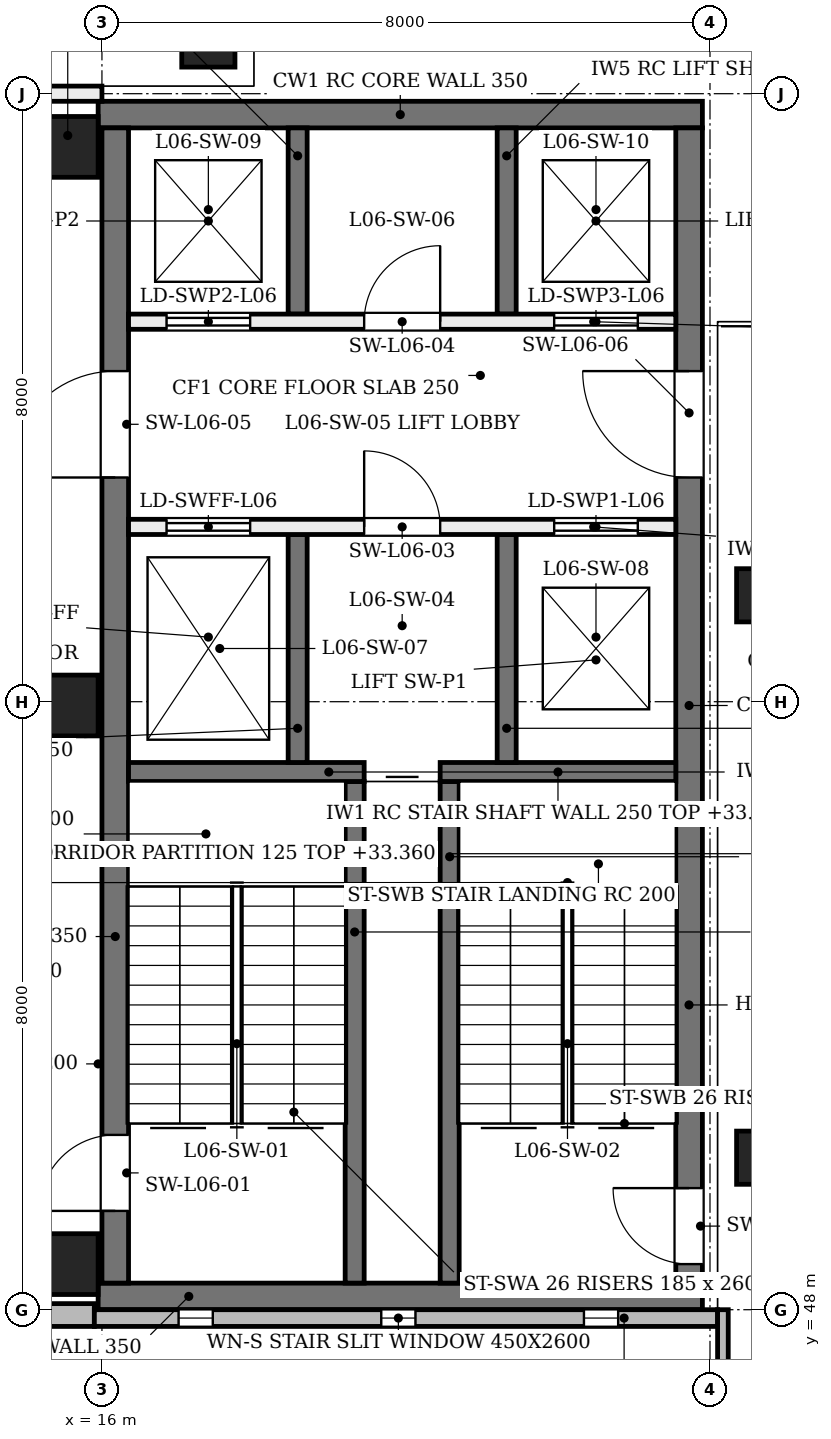
"""IFC4 building model, lengths in metres.
Left out: names, types, materials, properties, quantities, classifications, styles, units other than length and angle.
Written with IfcOpenShell. Run it as: python <this file> out.ifc"""

import sys

from ifc_helpers import new_model, si_unit, direction, frame, frame_2d, origin, origin_2d, place, context, subcontext, project, spatial, rectangle, extrude, element, fill, save


model = new_model("IFC4")
c1 = context("Model", 3, precision=1e-05, world=origin(), true_north=direction((0.0, 1.0)))
c2 = subcontext(c1, "Body", "Model", "MODEL_VIEW")
j1 = project(units=[si_unit("LENGTHUNIT", "METRE"), si_unit("PLANEANGLEUNIT", "RADIAN")], contexts=[c1])
p1 = place(None, origin())
s1 = spatial("IfcSite", under=j1, at=p1, CompositionType="ELEMENT")
p2 = place(p1, origin())
s2 = spatial("IfcBuilding", under=s1, at=p2, CompositionType="ELEMENT")
p3 = place(p2, frame((0.0, 0.0, 28.8)))
s3 = spatial("IfcBuildingStorey", under=s2, at=p3, CompositionType="ELEMENT", Elevation=28.8)
for number, where, z_axis, x_axis in (
    (1, (15.95, 48.175, 0.0), (0.0, 0.0, 1.0), (1.0, 0.0, 0.0)),
    (2, (15.95, 63.725, 0.0), (0.0, 0.0, 1.0), (1.0, 0.0, 0.0)),
):
    element("IfcWall", number, at=place(p3, frame(where, z_axis=z_axis, x_axis=x_axis)), inside=s3, PredefinedType="SHEAR", context=c2, shape_type="SweptSolid", body=[
        extrude(rectangle(XDim=7.95, YDim=0.35, at=frame_2d((3.975, 0.0))), origin(), (0.0, 0.0, 1.0), 4.58),
    ])
p4 = place(p3, frame((16.175, 48.35, 0.0), z_axis=(0.0, 0.0, 1.0), x_axis=(0.0, 1.0, 0.0)))
e3 = element("IfcWall", 3, at=p4, inside=s3, PredefinedType="SHEAR", context=c2, shape_type="SweptSolid", body=[
    extrude(rectangle(XDim=15.2, YDim=0.35, at=frame_2d((7.6, 0.0))), origin(), (0.0, 0.0, 1.0), 4.58),
])
p5 = place(p4, frame((0.95, 0.0, 0.0)))
e4 = element("IfcOpeningElement", 4, at=p5, cuts=e3, PredefinedType="OPENING", context=c2, shape_type="SweptSolid", body=[
    extrude(rectangle(XDim=1.0, YDim=2.1, at=frame_2d((0.5, 1.05))), frame((0.0, 0.185, 0.0), z_axis=(0.0, -1.0, 0.0), x_axis=(1.0, 0.0, 0.0)), (0.0, 0.0, 1.0), 0.37),
])
p6 = place(p4, frame((10.6, 0.0, 0.0)))
e5 = element("IfcOpeningElement", 5, at=p6, cuts=e3, PredefinedType="OPENING", context=c2, shape_type="SweptSolid", body=[
    extrude(rectangle(XDim=1.4, YDim=2.1, at=frame_2d((0.7, 1.05))), frame((0.0, 0.185, 0.0), z_axis=(0.0, -1.0, 0.0), x_axis=(1.0, 0.0, 0.0)), (0.0, 0.0, 1.0), 0.37),
])
p7 = place(p3, frame((23.725, 48.35, 0.0), z_axis=(0.0, 0.0, 1.0), x_axis=(0.0, 1.0, 0.0)))
e6 = element("IfcWall", 6, at=p7, inside=s3, PredefinedType="SHEAR", context=c2, shape_type="SweptSolid", body=[
    extrude(rectangle(XDim=15.2, YDim=0.35, at=frame_2d((7.6, 0.0))), origin(), (0.0, 0.0, 1.0), 4.58),
])
p8 = place(p7, frame((0.25, 0.0, 0.0)))
e7 = element("IfcOpeningElement", 7, at=p8, cuts=e6, PredefinedType="OPENING", context=c2, shape_type="SweptSolid", body=[
    extrude(rectangle(XDim=1.0, YDim=2.1, at=frame_2d((0.5, 1.05))), frame((0.0, 0.185, 0.0), z_axis=(0.0, -1.0, 0.0), x_axis=(1.0, 0.0, 0.0)), (0.0, 0.0, 1.0), 0.37),
])
p9 = place(p7, frame((10.6, 0.0, 0.0)))
e8 = element("IfcOpeningElement", 8, at=p9, cuts=e6, PredefinedType="OPENING", context=c2, shape_type="SweptSolid", body=[
    extrude(rectangle(XDim=1.4, YDim=2.1, at=frame_2d((0.7, 1.05))), frame((0.0, 0.185, 0.0), z_axis=(0.0, -1.0, 0.0), x_axis=(1.0, 0.0, 0.0)), (0.0, 0.0, 1.0), 0.37),
])
for number, where, z_axis, x_axis in (
    (9, (15.55, 48.6, 0.0), (0.0, 0.0, 1.0), (1.0, 0.0, 0.0)),
    (10, (15.55, 55.95, 0.0), (0.0, 0.0, 1.0), (1.0, 0.0, 0.0)),
    (11, (15.55, 63.3, 0.0), (0.0, 0.0, 1.0), (1.0, 0.0, 0.0)),
):
    element("IfcColumn", number, at=place(p3, frame(where, z_axis=z_axis, x_axis=x_axis)), inside=s3, PredefinedType="COLUMN", context=c2, shape_type="SweptSolid", body=[
        extrude(rectangle(XDim=0.8, YDim=0.8, at=origin_2d()), origin(), (0.0, 0.0, 1.0), 4.58),
    ])
for number, where, z_axis, x_axis in (
    (12, (24.7, 50.0, 0.0), (0.0, 0.0, 1.0), (1.0, 0.0, 0.0)),
    (13, (24.7, 57.4, 0.0), (0.0, 0.0, 1.0), (1.0, 0.0, 0.0)),
    (14, (17.4, 64.7, 0.0), (0.0, 0.0, 1.0), (1.0, 0.0, 0.0)),
):
    element("IfcColumn", number, at=place(p3, frame(where, z_axis=z_axis, x_axis=x_axis)), inside=s3, PredefinedType="COLUMN", context=c2, shape_type="SweptSolid", body=[
        extrude(rectangle(XDim=0.7, YDim=0.7, at=origin_2d()), origin(), (0.0, 0.0, 1.0), 4.58),
    ])
p10 = place(p3, frame((8.0, 47.93, 0.0), z_axis=(0.0, 0.0, 1.0), x_axis=(1.0, 0.0, 0.0)))
e15 = element("IfcWall", 15, at=p10, inside=s3, PredefinedType="SOLIDWALL", context=c2, shape_type="SweptSolid", body=[
    extrude(rectangle(XDim=7.9, YDim=0.3, at=frame_2d((3.95, 0.0))), origin(), (0.0, 0.0, 1.0), 3.9),
])
p11 = place(p10, frame((0.717, 0.0, 1.0)))
e16 = element("IfcOpeningElement", 16, at=p11, cuts=e15, PredefinedType="OPENING", context=c2, shape_type="SweptSolid", body=[
    extrude(rectangle(XDim=1.2, YDim=2.4, at=frame_2d((0.6, 1.2))), frame((0.0, 0.16, 0.0), z_axis=(0.0, -1.0, 0.0), x_axis=(1.0, 0.0, 0.0)), (0.0, 0.0, 1.0), 0.32),
])
p12 = place(p10, frame((3.35, 0.0, 1.0)))
e17 = element("IfcOpeningElement", 17, at=p12, cuts=e15, PredefinedType="OPENING", context=c2, shape_type="SweptSolid", body=[
    extrude(rectangle(XDim=1.2, YDim=2.4, at=frame_2d((0.6, 1.2))), frame((0.0, 0.16, 0.0), z_axis=(0.0, -1.0, 0.0), x_axis=(1.0, 0.0, 0.0)), (0.0, 0.0, 1.0), 0.32),
])
p13 = place(p10, frame((5.983, 0.0, 1.0)))
e18 = element("IfcOpeningElement", 18, at=p13, cuts=e15, PredefinedType="OPENING", context=c2, shape_type="SweptSolid", body=[
    extrude(rectangle(XDim=1.2, YDim=2.4, at=frame_2d((0.6, 1.2))), frame((0.0, 0.16, 0.0), z_axis=(0.0, -1.0, 0.0), x_axis=(1.0, 0.0, 0.0)), (0.0, 0.0, 1.0), 0.32),
])
p14 = place(p3, frame((15.9, 47.89, 0.0), z_axis=(0.0, 0.0, 1.0), x_axis=(1.0, 0.0, 0.0)))
e19 = element("IfcWall", 19, at=p14, inside=s3, PredefinedType="SOLIDWALL", context=c2, shape_type="SweptSolid", body=[
    extrude(rectangle(XDim=8.2, YDim=0.22, at=frame_2d((4.1, 0.0))), origin(), (0.0, 0.0, 1.0), 3.9),
])
p15 = place(p14, frame((1.108, 0.0, 0.9)))
e20 = element("IfcOpeningElement", 20, at=p15, cuts=e19, PredefinedType="OPENING", context=c2, shape_type="SweptSolid", body=[
    extrude(rectangle(XDim=0.45, YDim=2.6, at=frame_2d((0.225, 1.3))), frame((0.0, 0.12, 0.0), z_axis=(0.0, -1.0, 0.0), x_axis=(1.0, 0.0, 0.0)), (0.0, 0.0, 1.0), 0.24),
])
p16 = place(p14, frame((3.775, 0.0, 0.9)))
e21 = element("IfcOpeningElement", 21, at=p16, cuts=e19, PredefinedType="OPENING", context=c2, shape_type="SweptSolid", body=[
    extrude(rectangle(XDim=0.45, YDim=2.6, at=frame_2d((0.225, 1.3))), frame((0.0, 0.12, 0.0), z_axis=(0.0, -1.0, 0.0), x_axis=(1.0, 0.0, 0.0)), (0.0, 0.0, 1.0), 0.24),
])
p17 = place(p14, frame((6.442, 0.0, 0.9)))
e22 = element("IfcOpeningElement", 22, at=p17, cuts=e19, PredefinedType="OPENING", context=c2, shape_type="SweptSolid", body=[
    extrude(rectangle(XDim=0.45, YDim=2.6, at=frame_2d((0.225, 1.3))), frame((0.0, 0.12, 0.0), z_axis=(0.0, -1.0, 0.0), x_axis=(1.0, 0.0, 0.0)), (0.0, 0.0, 1.0), 0.24),
])
p18 = place(p3, frame((24.17, 42.0, 0.0), z_axis=(0.0, 0.0, 1.0), x_axis=(0.0, 1.0, 0.0)))
e23 = element("IfcWall", 23, at=p18, inside=s3, PredefinedType="SOLIDWALL", context=c2, shape_type="SweptSolid", body=[
    extrude(rectangle(XDim=6.0, YDim=0.14, at=frame_2d((3.0, 0.0))), origin(), (0.0, 0.0, 1.0), 3.9),
])
for number, where, z_axis, x_axis in (
    (24, (19.325, 48.35, 0.0), (0.0, 0.0, 1.0), (0.0, 1.0, 0.0)),
    (25, (20.575, 48.35, 0.0), (0.0, 0.0, 1.0), (0.0, 1.0, 0.0)),
):
    element("IfcWall", number, at=place(p3, frame(where, z_axis=z_axis, x_axis=x_axis)), inside=s3, PredefinedType="SOLIDWALL", context=c2, shape_type="SweptSolid", body=[
        extrude(rectangle(XDim=6.6, YDim=0.25, at=frame_2d((3.3, 0.0))), origin(), (0.0, 0.0, 1.0), 4.55),
    ])
p19 = place(p3, frame((16.35, 55.075, 0.0), z_axis=(0.0, 0.0, 1.0), x_axis=(1.0, 0.0, 0.0)))
e26 = element("IfcWall", 26, at=p19, inside=s3, PredefinedType="SOLIDWALL", context=c2, shape_type="SweptSolid", body=[
    extrude(rectangle(XDim=3.1, YDim=0.25, at=frame_2d((1.55, 0.0))), origin(), (0.0, 0.0, 1.0), 4.55),
])
p20 = place(p3, frame((20.45, 55.075, 0.0), z_axis=(0.0, 0.0, 1.0), x_axis=(1.0, 0.0, 0.0)))
e27 = element("IfcWall", 27, at=p20, inside=s3, PredefinedType="SOLIDWALL", context=c2, shape_type="SweptSolid", body=[
    extrude(rectangle(XDim=3.1, YDim=0.25, at=frame_2d((1.55, 0.0))), origin(), (0.0, 0.0, 1.0), 4.55),
])
p21 = place(p3, frame((18.575, 55.2, 0.0), z_axis=(0.0, 0.0, 1.0), x_axis=(0.0, 1.0, 0.0)))
e28 = element("IfcWall", 28, at=p21, inside=s3, PredefinedType="SOLIDWALL", context=c2, shape_type="SweptSolid", body=[
    extrude(rectangle(XDim=3.0, YDim=0.25, at=frame_2d((1.5, 0.0))), origin(), (0.0, 0.0, 1.0), 4.55),
])
p22 = place(p3, frame((18.575, 61.1, 0.0), z_axis=(0.0, 0.0, 1.0), x_axis=(0.0, 1.0, 0.0)))
e29 = element("IfcWall", 29, at=p22, inside=s3, PredefinedType="SOLIDWALL", context=c2, shape_type="SweptSolid", body=[
    extrude(rectangle(XDim=2.45, YDim=0.25, at=frame_2d((1.225, 0.0))), origin(), (0.0, 0.0, 1.0), 4.55),
])
p23 = place(p3, frame((21.325, 55.2, 0.0), z_axis=(0.0, 0.0, 1.0), x_axis=(0.0, 1.0, 0.0)))
e30 = element("IfcWall", 30, at=p23, inside=s3, PredefinedType="SOLIDWALL", context=c2, shape_type="SweptSolid", body=[
    extrude(rectangle(XDim=3.0, YDim=0.25, at=frame_2d((1.5, 0.0))), origin(), (0.0, 0.0, 1.0), 4.55),
])
p24 = place(p3, frame((21.325, 61.1, 0.0), z_axis=(0.0, 0.0, 1.0), x_axis=(0.0, 1.0, 0.0)))
e31 = element("IfcWall", 31, at=p24, inside=s3, PredefinedType="SOLIDWALL", context=c2, shape_type="SweptSolid", body=[
    extrude(rectangle(XDim=2.45, YDim=0.25, at=frame_2d((1.225, 0.0))), origin(), (0.0, 0.0, 1.0), 4.55),
])
p25 = place(p3, frame((16.35, 58.3, 0.0), z_axis=(0.0, 0.0, 1.0), x_axis=(1.0, 0.0, 0.0)))
e32 = element("IfcWall", 32, at=p25, inside=s3, PredefinedType="SOLIDWALL", context=c2, shape_type="SweptSolid", body=[
    extrude(rectangle(XDim=7.2, YDim=0.2, at=frame_2d((3.6, 0.0))), origin(), (0.0, 0.0, 1.0), 4.55),
])
p26 = place(p25, frame((0.5, 0.0, 0.0)))
e33 = element("IfcOpeningElement", 33, at=p26, cuts=e32, PredefinedType="OPENING", context=c2, shape_type="SweptSolid", body=[
    extrude(rectangle(XDim=1.1, YDim=2.1, at=frame_2d((0.55, 1.05))), frame((0.0, 0.11, 0.0), z_axis=(0.0, -1.0, 0.0), x_axis=(1.0, 0.0, 0.0)), (0.0, 0.0, 1.0), 0.22),
])
p27 = place(p25, frame((5.6, 0.0, 0.0)))
e34 = element("IfcOpeningElement", 34, at=p27, cuts=e32, PredefinedType="OPENING", context=c2, shape_type="SweptSolid", body=[
    extrude(rectangle(XDim=1.1, YDim=2.1, at=frame_2d((0.55, 1.05))), frame((0.0, 0.11, 0.0), z_axis=(0.0, -1.0, 0.0), x_axis=(1.0, 0.0, 0.0)), (0.0, 0.0, 1.0), 0.22),
])
p28 = place(p25, frame((3.1, 0.0, 0.0)))
e35 = element("IfcOpeningElement", 35, at=p28, cuts=e32, PredefinedType="OPENING", context=c2, shape_type="SweptSolid", body=[
    extrude(rectangle(XDim=1.0, YDim=2.1, at=frame_2d((0.5, 1.05))), frame((0.0, 0.11, 0.0), z_axis=(0.0, -1.0, 0.0), x_axis=(1.0, 0.0, 0.0)), (0.0, 0.0, 1.0), 0.22),
])
p29 = place(p3, frame((16.35, 61.0, 0.0), z_axis=(0.0, 0.0, 1.0), x_axis=(1.0, 0.0, 0.0)))
e36 = element("IfcWall", 36, at=p29, inside=s3, PredefinedType="SOLIDWALL", context=c2, shape_type="SweptSolid", body=[
    extrude(rectangle(XDim=7.2, YDim=0.2, at=frame_2d((3.6, 0.0))), origin(), (0.0, 0.0, 1.0), 4.55),
])
p30 = place(p29, frame((0.5, 0.0, 0.0)))
e37 = element("IfcOpeningElement", 37, at=p30, cuts=e36, PredefinedType="OPENING", context=c2, shape_type="SweptSolid", body=[
    extrude(rectangle(XDim=1.1, YDim=2.1, at=frame_2d((0.55, 1.05))), frame((0.0, 0.11, 0.0), z_axis=(0.0, -1.0, 0.0), x_axis=(1.0, 0.0, 0.0)), (0.0, 0.0, 1.0), 0.22),
])
p31 = place(p29, frame((5.6, 0.0, 0.0)))
e38 = element("IfcOpeningElement", 38, at=p31, cuts=e36, PredefinedType="OPENING", context=c2, shape_type="SweptSolid", body=[
    extrude(rectangle(XDim=1.1, YDim=2.1, at=frame_2d((0.55, 1.05))), frame((0.0, 0.11, 0.0), z_axis=(0.0, -1.0, 0.0), x_axis=(1.0, 0.0, 0.0)), (0.0, 0.0, 1.0), 0.22),
])
p32 = place(p29, frame((3.1, 0.0, 0.0)))
e39 = element("IfcOpeningElement", 39, at=p32, cuts=e36, PredefinedType="OPENING", context=c2, shape_type="SweptSolid", body=[
    extrude(rectangle(XDim=1.0, YDim=2.1, at=frame_2d((0.5, 1.05))), frame((0.0, 0.11, 0.0), z_axis=(0.0, -1.0, 0.0), x_axis=(1.0, 0.0, 0.0)), (0.0, 0.0, 1.0), 0.22),
])
p33 = place(p3, frame((12.4, 64.0, 0.0), z_axis=(0.0, 0.0, 1.0), x_axis=(1.0, 0.0, 0.0)))
e40 = element("IfcWall", 40, at=p33, inside=s3, PredefinedType="PARTITIONING", context=c2, shape_type="SweptSolid", body=[
    extrude(rectangle(XDim=3.6, YDim=0.2, at=frame_2d((1.8, 0.0))), origin(), (0.0, 0.0, 1.0), 3.88),
])
p34 = place(p33, frame((1.0, 0.0, 0.0)))
e41 = element("IfcOpeningElement", 41, at=p34, cuts=e40, PredefinedType="OPENING", context=c2, shape_type="SweptSolid", body=[
    extrude(rectangle(XDim=1.6, YDim=2.1, at=frame_2d((0.8, 1.05))), frame((0.0, 0.11, 0.0), z_axis=(0.0, -1.0, 0.0), x_axis=(1.0, 0.0, 0.0)), (0.0, 0.0, 1.0), 0.22),
])
p35 = place(p15, origin())
e42 = element("IfcWindow", 42, at=p35, inside=s3, PartitioningType="SINGLE_PANEL", PredefinedType="WINDOW", context=c2, shape_type="SweptSolid", body=[
    extrude(rectangle(XDim=0.45, YDim=2.6, at=frame_2d((0.225, 1.3))), frame((0.0, 0.03, 0.0), z_axis=(0.0, -1.0, 0.0), x_axis=(1.0, 0.0, 0.0)), (0.0, 0.0, 1.0), 0.06),
])
fill(e20, e42)
p36 = place(p16, origin())
e43 = element("IfcWindow", 43, at=p36, inside=s3, PartitioningType="SINGLE_PANEL", PredefinedType="WINDOW", context=c2, shape_type="SweptSolid", body=[
    extrude(rectangle(XDim=0.45, YDim=2.6, at=frame_2d((0.225, 1.3))), frame((0.0, 0.03, 0.0), z_axis=(0.0, -1.0, 0.0), x_axis=(1.0, 0.0, 0.0)), (0.0, 0.0, 1.0), 0.06),
])
fill(e21, e43)
p37 = place(p17, origin())
e44 = element("IfcWindow", 44, at=p37, inside=s3, PartitioningType="SINGLE_PANEL", PredefinedType="WINDOW", context=c2, shape_type="SweptSolid", body=[
    extrude(rectangle(XDim=0.45, YDim=2.6, at=frame_2d((0.225, 1.3))), frame((0.0, 0.03, 0.0), z_axis=(0.0, -1.0, 0.0), x_axis=(1.0, 0.0, 0.0)), (0.0, 0.0, 1.0), 0.06),
])
fill(e22, e44)
p38 = place(p5, origin())
e45 = element("IfcDoor", 45, at=p38, inside=s3, OperationType="SINGLE_SWING_LEFT", PredefinedType="DOOR", context=c2, shape_type="SweptSolid", body=[
    extrude(rectangle(XDim=1.0, YDim=2.1, at=frame_2d((0.5, 1.05))), frame((0.0, 0.025, 0.0), z_axis=(0.0, -1.0, 0.0), x_axis=(1.0, 0.0, 0.0)), (0.0, 0.0, 1.0), 0.05),
])
fill(e4, e45)
p39 = place(p8, frame((1.0, 0.0, 0.0), z_axis=(0.0, 0.0, 1.0), x_axis=(-1.0, 0.0, 0.0)))
e46 = element("IfcDoor", 46, at=p39, inside=s3, OperationType="SINGLE_SWING_RIGHT", PredefinedType="DOOR", context=c2, shape_type="SweptSolid", body=[
    extrude(rectangle(XDim=1.0, YDim=2.1, at=frame_2d((0.5, 1.05))), frame((0.0, 0.025, 0.0), z_axis=(0.0, -1.0, 0.0), x_axis=(1.0, 0.0, 0.0)), (0.0, 0.0, 1.0), 0.05),
])
fill(e7, e46)
p40 = place(p26, origin())
e47 = element("IfcDoor", 47, at=p40, inside=s3, OperationType="DOUBLE_DOOR_SLIDING", PredefinedType="DOOR", context=c2, shape_type="SweptSolid", body=[
    extrude(rectangle(XDim=1.1, YDim=2.1, at=frame_2d((0.55, 1.05))), frame((0.0, 0.025, 0.0), z_axis=(0.0, -1.0, 0.0), x_axis=(1.0, 0.0, 0.0)), (0.0, 0.0, 1.0), 0.05),
])
fill(e33, e47)
p41 = place(p27, origin())
e48 = element("IfcDoor", 48, at=p41, inside=s3, OperationType="DOUBLE_DOOR_SLIDING", PredefinedType="DOOR", context=c2, shape_type="SweptSolid", body=[
    extrude(rectangle(XDim=1.1, YDim=2.1, at=frame_2d((0.55, 1.05))), frame((0.0, 0.025, 0.0), z_axis=(0.0, -1.0, 0.0), x_axis=(1.0, 0.0, 0.0)), (0.0, 0.0, 1.0), 0.05),
])
fill(e34, e48)
p42 = place(p30, frame((1.1, 0.0, 0.0), z_axis=(0.0, 0.0, 1.0), x_axis=(-1.0, 0.0, 0.0)))
e49 = element("IfcDoor", 49, at=p42, inside=s3, OperationType="DOUBLE_DOOR_SLIDING", PredefinedType="DOOR", context=c2, shape_type="SweptSolid", body=[
    extrude(rectangle(XDim=1.1, YDim=2.1, at=frame_2d((0.55, 1.05))), frame((0.0, 0.025, 0.0), z_axis=(0.0, -1.0, 0.0), x_axis=(1.0, 0.0, 0.0)), (0.0, 0.0, 1.0), 0.05),
])
fill(e37, e49)
p43 = place(p31, frame((1.1, 0.0, 0.0), z_axis=(0.0, 0.0, 1.0), x_axis=(-1.0, 0.0, 0.0)))
e50 = element("IfcDoor", 50, at=p43, inside=s3, OperationType="DOUBLE_DOOR_SLIDING", PredefinedType="DOOR", context=c2, shape_type="SweptSolid", body=[
    extrude(rectangle(XDim=1.1, YDim=2.1, at=frame_2d((0.55, 1.05))), frame((0.0, 0.025, 0.0), z_axis=(0.0, -1.0, 0.0), x_axis=(1.0, 0.0, 0.0)), (0.0, 0.0, 1.0), 0.05),
])
fill(e38, e50)
p44 = place(p28, origin())
e51 = element("IfcDoor", 51, at=p44, inside=s3, OperationType="SINGLE_SWING_LEFT", PredefinedType="DOOR", context=c2, shape_type="SweptSolid", body=[
    extrude(rectangle(XDim=1.0, YDim=2.1, at=frame_2d((0.5, 1.05))), frame((0.0, 0.025, 0.0), z_axis=(0.0, -1.0, 0.0), x_axis=(1.0, 0.0, 0.0)), (0.0, 0.0, 1.0), 0.05),
])
fill(e35, e51)
p45 = place(p32, frame((1.0, 0.0, 0.0), z_axis=(0.0, 0.0, 1.0), x_axis=(-1.0, 0.0, 0.0)))
e52 = element("IfcDoor", 52, at=p45, inside=s3, OperationType="SINGLE_SWING_RIGHT", PredefinedType="DOOR", context=c2, shape_type="SweptSolid", body=[
    extrude(rectangle(XDim=1.0, YDim=2.1, at=frame_2d((0.5, 1.05))), frame((0.0, 0.025, 0.0), z_axis=(0.0, -1.0, 0.0), x_axis=(1.0, 0.0, 0.0)), (0.0, 0.0, 1.0), 0.05),
])
fill(e39, e52)
p46 = place(p6, origin())
e53 = element("IfcDoor", 53, at=p46, inside=s3, OperationType="SINGLE_SWING_LEFT", PredefinedType="DOOR", context=c2, shape_type="SweptSolid", body=[
    extrude(rectangle(XDim=1.4, YDim=2.1, at=frame_2d((0.7, 1.05))), frame((0.0, 0.025, 0.0), z_axis=(0.0, -1.0, 0.0), x_axis=(1.0, 0.0, 0.0)), (0.0, 0.0, 1.0), 0.05),
])
fill(e5, e53)
p47 = place(p9, frame((1.4, 0.0, 0.0), z_axis=(0.0, 0.0, 1.0), x_axis=(-1.0, 0.0, 0.0)))
e54 = element("IfcDoor", 54, at=p47, inside=s3, OperationType="SINGLE_SWING_RIGHT", PredefinedType="DOOR", context=c2, shape_type="SweptSolid", body=[
    extrude(rectangle(XDim=1.4, YDim=2.1, at=frame_2d((0.7, 1.05))), frame((0.0, 0.025, 0.0), z_axis=(0.0, -1.0, 0.0), x_axis=(1.0, 0.0, 0.0)), (0.0, 0.0, 1.0), 0.05),
])
fill(e8, e54)
save(model, sys.argv[1])
